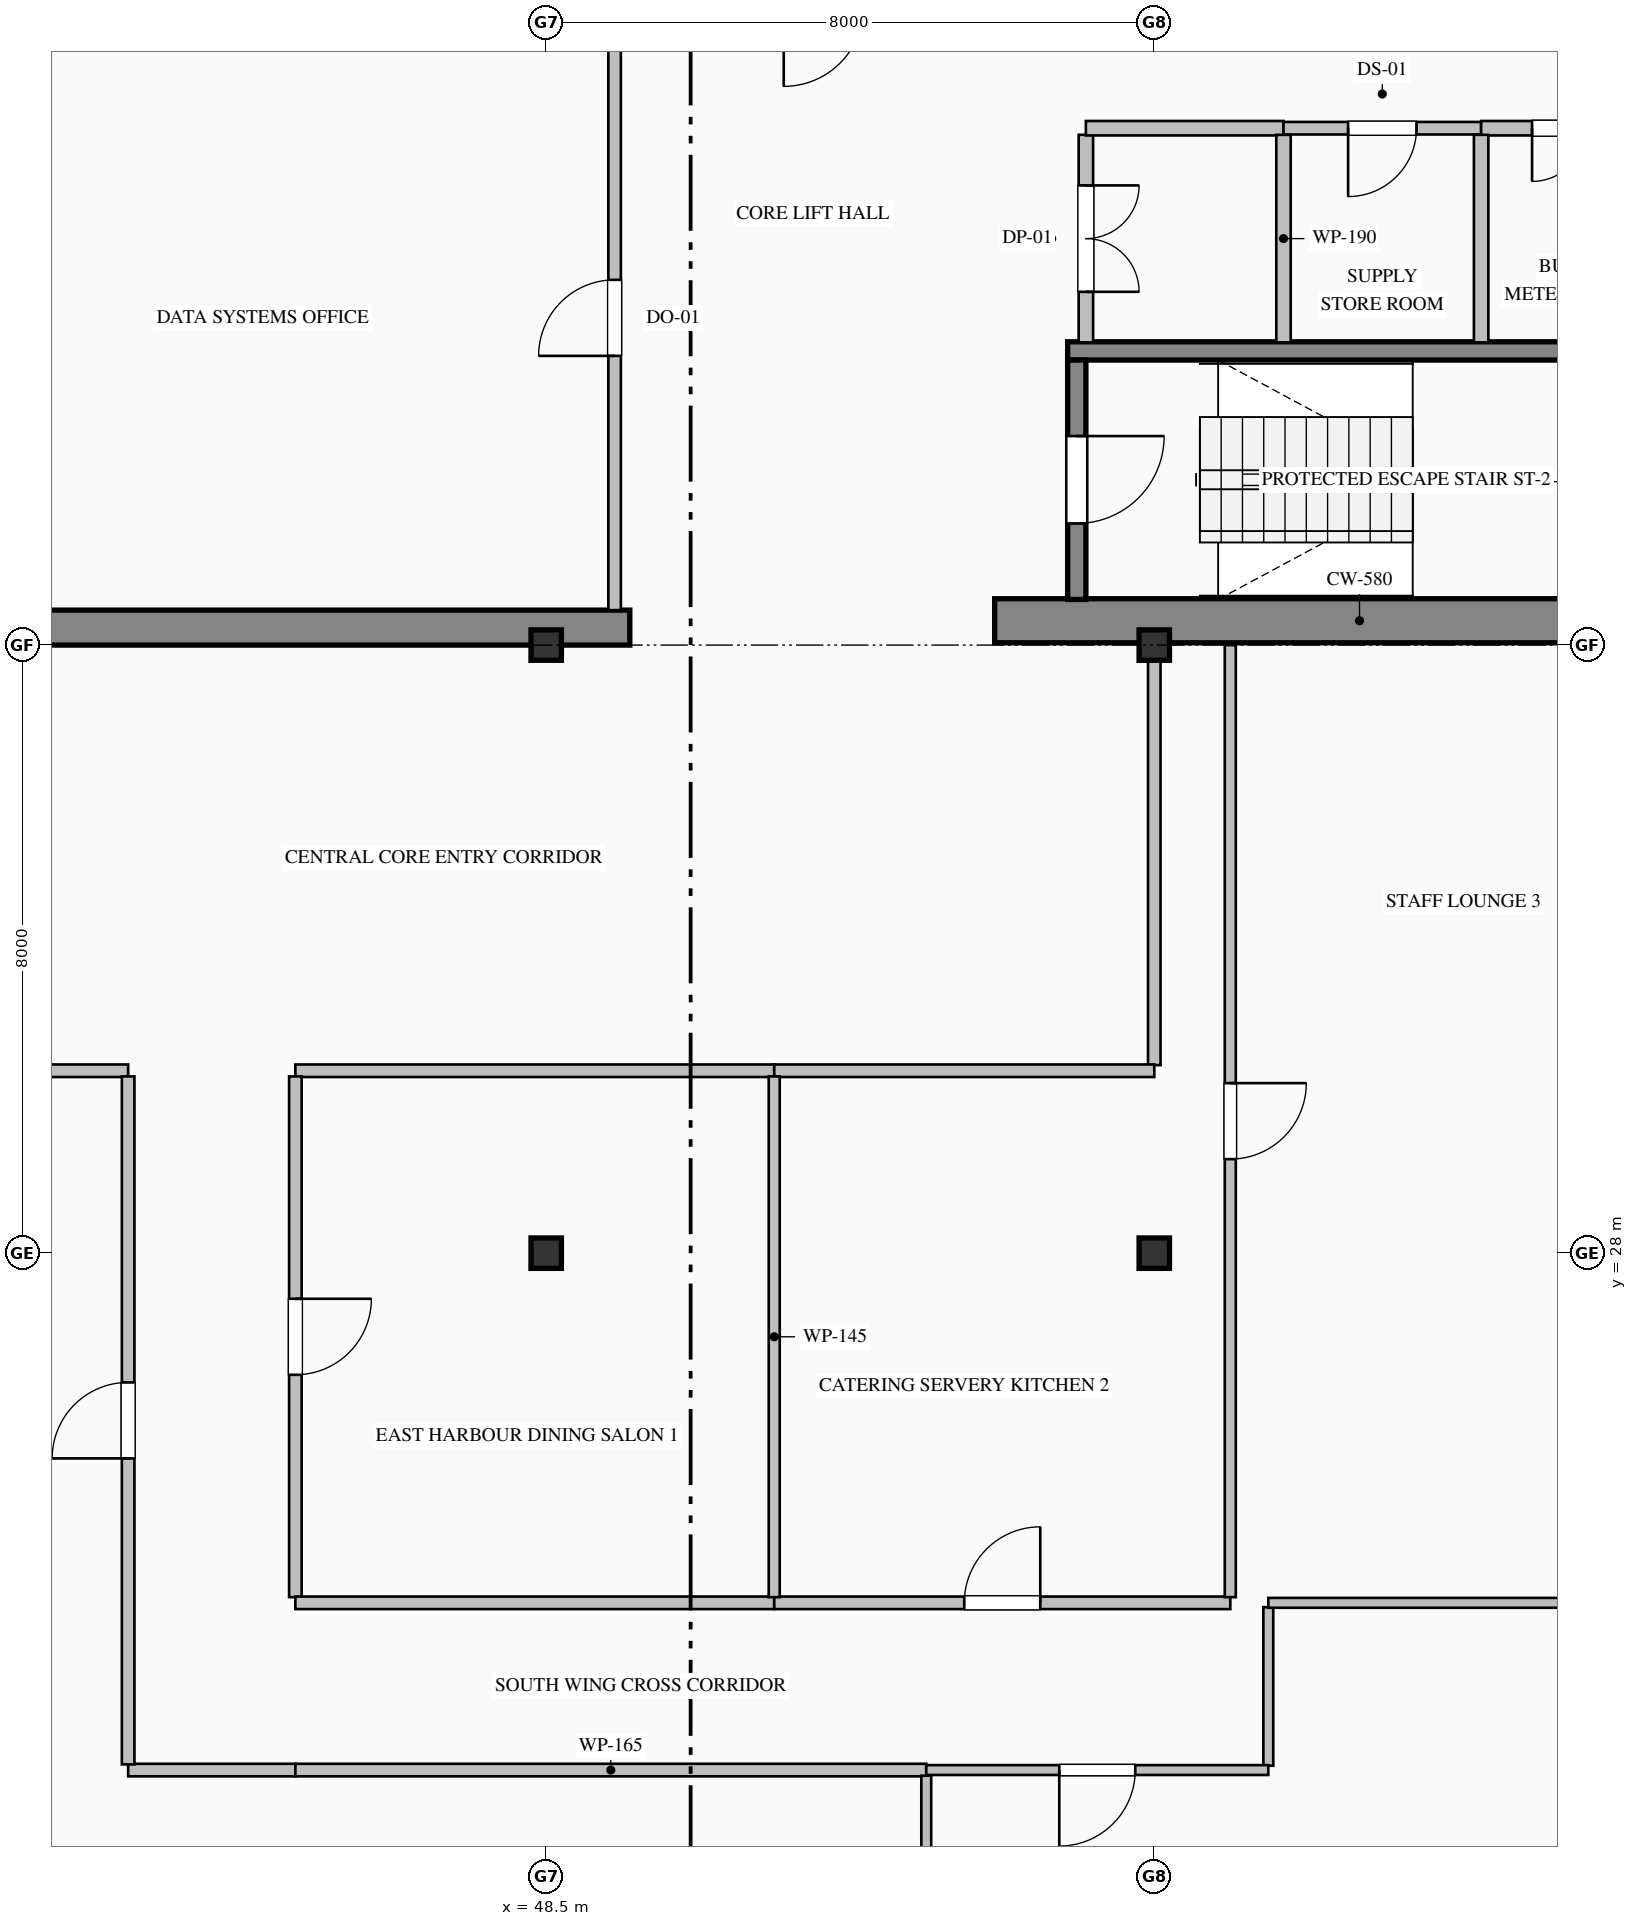
"""IFC4 building model, lengths in metres.
Left out: names, types, materials, properties, quantities, classifications, styles, units other than length and angle.
Written with IfcOpenShell. Run it as: python <this file> out.ifc"""

import sys

from ifc_helpers import new_model, si_unit, direction, frame, frame_2d, origin, origin_2d, place, context, subcontext, project, spatial, rectangle, i_section, extrude, element, fill, save


model = new_model("IFC4")
c1 = context("Model", 3, precision=1e-05, world=origin(), true_north=direction((0.0, 1.0)))
c2 = subcontext(c1, "Body", "Model", "MODEL_VIEW")
j1 = project(units=[si_unit("LENGTHUNIT", "METRE"), si_unit("PLANEANGLEUNIT", "RADIAN")], contexts=[c1])
p1 = place(None, origin())
s1 = spatial("IfcSite", under=j1, at=p1, CompositionType="ELEMENT")
p2 = place(p1, origin())
s2 = spatial("IfcBuilding", under=s1, at=p2, CompositionType="ELEMENT")
p3 = place(p2, frame((0.0, 0.0, 241.8)))
s3 = spatial("IfcBuildingStorey", under=s2, at=p3, CompositionType="ELEMENT", Elevation=241.8)
p4 = place(p3, frame((40.5, 36.23, 0.0), z_axis=(0.0, 0.0, 1.0), x_axis=(1.0, 0.0, 0.0)))
e1 = element("IfcWall", 1, at=p4, inside=s3, PredefinedType="SHEAR", context=c2, shape_type="SweptSolid", body=[
    extrude(rectangle(XDim=9.1, YDim=0.46, at=frame_2d((4.55, 0.0))), origin(), (0.0, 0.0, 1.0), 3.775),
])
p5 = place(p3, frame((54.4, 36.32, 0.0), z_axis=(0.0, 0.0, 1.0), x_axis=(1.0, 0.0, 0.0)))
e2 = element("IfcWall", 2, at=p5, inside=s3, PredefinedType="SHEAR", context=c2, shape_type="SweptSolid", body=[
    extrude(rectangle(XDim=9.6, YDim=0.58, at=frame_2d((4.8, 0.0))), origin(), (0.0, 0.0, 1.0), 4.0),
])
for number, where, z_axis, x_axis in (
    (3, (48.5, 28.0, 0.0), (0.0, 0.0, 1.0), (1.0, 0.0, 0.0)),
    (4, (48.5, 36.0, 0.0), (0.0, 0.0, 1.0), (1.0, 0.0, 0.0)),
    (5, (56.5, 28.0, 0.0), (0.0, 0.0, 1.0), (1.0, 0.0, 0.0)),
    (6, (56.5, 36.0, 0.0), (0.0, 0.0, 1.0), (1.0, 0.0, 0.0)),
):
    element("IfcColumn", number, at=place(p3, frame(where, z_axis=z_axis, x_axis=x_axis)), inside=s3, PredefinedType="COLUMN", context=c2, shape_type="SweptSolid", body=[
        extrude(i_section(OverallWidth=0.4, OverallDepth=0.4, WebThickness=0.013, FlangeThickness=0.021, FilletRadius=0.022, at=origin_2d()), origin(), (0.0, 0.0, 1.0), 4.0),
    ])
p6 = place(p3, frame((55.36, 39.87, 0.0), z_axis=(0.0, 0.0, 1.0), x_axis=(1.0, 0.0, 0.0)))
e7 = element("IfcWall", 7, at=p6, inside=s3, PredefinedType="SOLIDWALL", context=c2, shape_type="SweptSolid", body=[
    extrude(rectangle(XDim=8.08, YDim=0.24, at=frame_2d((4.04, 0.0))), origin(), (0.0, 0.0, 1.0), 4.0),
])
p7 = place(p3, frame((55.48, 39.75, 0.0), z_axis=(0.0, 0.0, 1.0), x_axis=(0.0, -1.0, 0.0)))
e8 = element("IfcWall", 8, at=p7, inside=s3, PredefinedType="SOLIDWALL", context=c2, shape_type="SweptSolid", body=[
    extrude(rectangle(XDim=3.15, YDim=0.24, at=frame_2d((1.575, 0.0))), origin(), (0.0, 0.0, 1.0), 4.0),
])
p8 = place(p7, frame((1.0, 0.0, 0.0)))
e9 = element("IfcOpeningElement", 9, at=p8, cuts=e8, PredefinedType="OPENING", context=c2, shape_type="SweptSolid", body=[
    extrude(rectangle(XDim=1.15, YDim=2.2, at=frame_2d((0.575, 1.1))), frame((0.0, 0.13, 0.0), z_axis=(0.0, -1.0, 0.0), x_axis=(1.0, 0.0, 0.0)), (0.0, 0.0, 1.0), 0.26),
])
p9 = place(p3, frame((49.4, 36.46, 0.0), z_axis=(0.0, 0.0, 1.0), x_axis=(0.0, 1.0, 0.0)))
e10 = element("IfcWall", 10, at=p9, inside=s3, PredefinedType="PARTITIONING", context=c2, shape_type="SweptSolid", body=[
    extrude(rectangle(XDim=7.69, YDim=0.165, at=frame_2d((3.845, 0.0))), origin(), (0.0, 0.0, 1.0), 3.017),
])
p10 = place(p9, frame((3.345, 0.0, 0.0)))
e11 = element("IfcOpeningElement", 11, at=p10, cuts=e10, PredefinedType="OPENING", context=c2, shape_type="SweptSolid", body=[
    extrude(rectangle(XDim=1.0, YDim=2.15, at=frame_2d((0.5, 1.075))), frame((0.0, 0.093, 0.0), z_axis=(0.0, -1.0, 0.0), x_axis=(1.0, 0.0, 0.0)), (0.0, 0.0, 1.0), 0.185),
])
p11 = place(p3, frame((55.6, 42.713, 0.0), z_axis=(0.0, 0.0, 1.0), x_axis=(0.0, -1.0, 0.0)))
e12 = element("IfcWall", 12, at=p11, inside=s3, PredefinedType="PARTITIONING", context=c2, shape_type="SweptSolid", body=[
    extrude(rectangle(XDim=2.731, YDim=0.19, at=frame_2d((1.365, 0.0))), origin(), (0.0, 0.0, 1.0), 3.775),
])
p12 = place(p11, frame((0.666, 0.0, 0.0)))
e13 = element("IfcOpeningElement", 13, at=p12, cuts=e12, PredefinedType="OPENING", context=c2, shape_type="SweptSolid", body=[
    extrude(rectangle(XDim=1.4, YDim=2.25, at=frame_2d((0.7, 1.125))), frame((0.0, 0.105, 0.0), z_axis=(0.0, -1.0, 0.0), x_axis=(1.0, 0.0, 0.0)), (0.0, 0.0, 1.0), 0.21),
])
p13 = place(p3, frame((58.2, 42.8, 0.0), z_axis=(0.0, 0.0, 1.0), x_axis=(-1.0, 0.0, 0.0)))
e14 = element("IfcWall", 14, at=p13, inside=s3, PredefinedType="PARTITIONING", context=c2, shape_type="SweptSolid", body=[
    extrude(rectangle(XDim=2.6, YDim=0.19, at=frame_2d((1.3, 0.0))), origin(), (0.0, 0.0, 1.0), 3.775),
])
p14 = place(p3, frame((60.8, 42.8, 0.0), z_axis=(0.0, 0.0, 1.0), x_axis=(-1.0, 0.0, 0.0)))
e15 = element("IfcWall", 15, at=p14, inside=s3, PredefinedType="PARTITIONING", context=c2, shape_type="SweptSolid", body=[
    extrude(rectangle(XDim=2.6, YDim=0.165, at=frame_2d((1.3, 0.0))), origin(), (0.0, 0.0, 1.0), 3.775),
])
p15 = place(p14, frame((0.85, 0.0, 0.0)))
e16 = element("IfcOpeningElement", 16, at=p15, cuts=e15, PredefinedType="OPENING", context=c2, shape_type="SweptSolid", body=[
    extrude(rectangle(XDim=0.9, YDim=2.15, at=frame_2d((0.45, 1.075))), frame((0.0, 0.093, 0.0), z_axis=(0.0, -1.0, 0.0), x_axis=(1.0, 0.0, 0.0)), (0.0, 0.0, 1.0), 0.185),
])
p16 = place(p3, frame((63.54, 42.8, 0.0), z_axis=(0.0, 0.0, 1.0), x_axis=(-1.0, 0.0, 0.0)))
e17 = element("IfcWall", 17, at=p16, inside=s3, PredefinedType="PARTITIONING", context=c2, shape_type="SweptSolid", body=[
    extrude(rectangle(XDim=2.74, YDim=0.19, at=frame_2d((1.37, 0.0))), origin(), (0.0, 0.0, 1.0), 3.775),
])
p17 = place(p16, frame((0.67, 0.0, 0.0)))
e18 = element("IfcOpeningElement", 18, at=p17, cuts=e17, PredefinedType="OPENING", context=c2, shape_type="SweptSolid", body=[
    extrude(rectangle(XDim=1.4, YDim=2.25, at=frame_2d((0.7, 1.125))), frame((0.0, 0.105, 0.0), z_axis=(0.0, -1.0, 0.0), x_axis=(1.0, 0.0, 0.0)), (0.0, 0.0, 1.0), 0.21),
])
for number, where, z_axis, x_axis in (
    (19, (58.2, 42.713, 0.0), (0.0, 0.0, 1.0), (0.0, -1.0, 0.0)),
    (20, (60.8, 42.713, 0.0), (0.0, 0.0, 1.0), (0.0, -1.0, 0.0)),
):
    element("IfcWall", number, at=place(p3, frame(where, z_axis=z_axis, x_axis=x_axis)), inside=s3, PredefinedType="PARTITIONING", context=c2, shape_type="SweptSolid", body=[
        extrude(rectangle(XDim=2.731, YDim=0.19, at=frame_2d((1.365, 0.0))), origin(), (0.0, 0.0, 1.0), 3.775),
    ])
p18 = place(p3, frame((51.5, 30.4, 0.0), z_axis=(0.0, 0.0, 1.0), x_axis=(-1.0, 0.0, 0.0)))
e21 = element("IfcWall", 21, at=p18, inside=s3, PredefinedType="PARTITIONING", context=c2, shape_type="SweptSolid", body=[
    extrude(rectangle(XDim=6.3, YDim=0.165, at=frame_2d((3.15, 0.0))), origin(), (0.0, 0.0, 1.0), 3.775),
])
p19 = place(p3, frame((56.5, 36.0, 0.0), z_axis=(0.0, 0.0, 1.0), x_axis=(0.0, -1.0, 0.0)))
e22 = element("IfcWall", 22, at=p19, inside=s3, PredefinedType="PARTITIONING", context=c2, shape_type="SweptSolid", body=[
    extrude(rectangle(XDim=5.525, YDim=0.165, at=frame_2d((2.763, 0.0))), origin(), (0.0, 0.0, 1.0), 3.179),
])
p20 = place(p3, frame((56.5, 30.4, 0.0), z_axis=(0.0, 0.0, 1.0), x_axis=(-1.0, 0.0, 0.0)))
e23 = element("IfcWall", 23, at=p20, inside=s3, PredefinedType="PARTITIONING", context=c2, shape_type="SweptSolid", body=[
    extrude(rectangle(XDim=5.0, YDim=0.165, at=frame_2d((2.5, 0.0))), origin(), (0.0, 0.0, 1.0), 3.775),
])
p21 = place(p3, frame((43.0, 30.4, 0.0), z_axis=(0.0, 0.0, 1.0), x_axis=(-1.0, 0.0, 0.0)))
e24 = element("IfcWall", 24, at=p21, inside=s3, PredefinedType="PARTITIONING", context=c2, shape_type="SweptSolid", body=[
    extrude(rectangle(XDim=2.5, YDim=0.165, at=frame_2d((1.25, 0.0))), origin(), (0.0, 0.0, 1.0), 3.775),
])
p22 = place(p3, frame((45.2, 30.325, 0.0), z_axis=(0.0, 0.0, 1.0), x_axis=(0.0, -1.0, 0.0)))
e25 = element("IfcWall", 25, at=p22, inside=s3, PredefinedType="PARTITIONING", context=c2, shape_type="SweptSolid", body=[
    extrude(rectangle(XDim=6.851, YDim=0.165, at=frame_2d((3.425, 0.0))), origin(), (0.0, 0.0, 1.0), 3.775),
])
p23 = place(p22, frame((2.926, 0.0, 0.0)))
e26 = element("IfcOpeningElement", 26, at=p23, cuts=e25, PredefinedType="OPENING", context=c2, shape_type="SweptSolid", body=[
    extrude(rectangle(XDim=1.0, YDim=2.15, at=frame_2d((0.5, 1.075))), frame((0.0, 0.093, 0.0), z_axis=(0.0, -1.0, 0.0), x_axis=(1.0, 0.0, 0.0)), (0.0, 0.0, 1.0), 0.185),
])
p24 = place(p3, frame((45.2, 21.2, 0.0), z_axis=(0.0, 0.0, 1.0), x_axis=(-1.0, 0.0, 0.0)))
e27 = element("IfcWall", 27, at=p24, inside=s3, PredefinedType="PARTITIONING", context=c2, shape_type="SweptSolid", body=[
    extrude(rectangle(XDim=2.2, YDim=0.165, at=frame_2d((1.1, 0.0))), origin(), (0.0, 0.0, 1.0), 3.775),
])
p25 = place(p3, frame((43.0, 21.274, 0.0), z_axis=(0.0, 0.0, 1.0), x_axis=(0.0, 1.0, 0.0)))
e28 = element("IfcWall", 28, at=p25, inside=s3, PredefinedType="PARTITIONING", context=c2, shape_type="SweptSolid", body=[
    extrude(rectangle(XDim=9.051, YDim=0.165, at=frame_2d((4.525, 0.0))), origin(), (0.0, 0.0, 1.0), 3.775),
])
p26 = place(p25, frame((4.025, 0.0, 0.0)))
e29 = element("IfcOpeningElement", 29, at=p26, cuts=e28, PredefinedType="OPENING", context=c2, shape_type="SweptSolid", body=[
    extrude(rectangle(XDim=1.0, YDim=2.15, at=frame_2d((0.5, 1.075))), frame((0.0, 0.093, 0.0), z_axis=(0.0, -1.0, 0.0), x_axis=(1.0, 0.0, 0.0)), (0.0, 0.0, 1.0), 0.185),
])
p27 = place(p3, frame((45.2, 23.4, 0.0), z_axis=(0.0, 0.0, 1.0), x_axis=(1.0, 0.0, 0.0)))
e30 = element("IfcWall", 30, at=p27, inside=s3, PredefinedType="PARTITIONING", context=c2, shape_type="SweptSolid", body=[
    extrude(rectangle(XDim=6.3, YDim=0.165, at=frame_2d((3.15, 0.0))), origin(), (0.0, 0.0, 1.0), 3.467),
])
p28 = place(p3, frame((51.5, 23.4, 0.0), z_axis=(0.0, 0.0, 1.0), x_axis=(1.0, 0.0, 0.0)))
e31 = element("IfcWall", 31, at=p28, inside=s3, PredefinedType="PARTITIONING", context=c2, shape_type="SweptSolid", body=[
    extrude(rectangle(XDim=6.0, YDim=0.165, at=frame_2d((3.0, 0.0))), origin(), (0.0, 0.0, 1.0), 3.467),
])
p29 = place(p28, frame((2.5, 0.0, 0.0)))
e32 = element("IfcOpeningElement", 32, at=p29, cuts=e31, PredefinedType="OPENING", context=c2, shape_type="SweptSolid", body=[
    extrude(rectangle(XDim=1.0, YDim=2.15, at=frame_2d((0.5, 1.075))), frame((0.0, 0.093, 0.0), z_axis=(0.0, -1.0, 0.0), x_axis=(1.0, 0.0, 0.0)), (0.0, 0.0, 1.0), 0.185),
])
p30 = place(p3, frame((53.5, 21.2, 0.0), z_axis=(0.0, 0.0, 1.0), x_axis=(-1.0, 0.0, 0.0)))
e33 = element("IfcWall", 33, at=p30, inside=s3, PredefinedType="PARTITIONING", context=c2, shape_type="SweptSolid", body=[
    extrude(rectangle(XDim=8.3, YDim=0.165, at=frame_2d((4.15, 0.0))), origin(), (0.0, 0.0, 1.0), 3.775),
])
p31 = place(p3, frame((58.0, 23.343, 0.0), z_axis=(0.0, 0.0, 1.0), x_axis=(0.0, -1.0, 0.0)))
e34 = element("IfcWall", 34, at=p31, inside=s3, PredefinedType="PARTITIONING", context=c2, shape_type="SweptSolid", body=[
    extrude(rectangle(XDim=2.086, YDim=0.13, at=frame_2d((1.043, 0.0))), origin(), (0.0, 0.0, 1.0), 3.775),
])
p32 = place(p3, frame((58.0, 21.2, 0.0), z_axis=(0.0, 0.0, 1.0), x_axis=(-1.0, 0.0, 0.0)))
e35 = element("IfcWall", 35, at=p32, inside=s3, PredefinedType="PARTITIONING", context=c2, shape_type="SweptSolid", body=[
    extrude(rectangle(XDim=4.5, YDim=0.13, at=frame_2d((2.25, 0.0))), origin(), (0.0, 0.0, 1.0), 3.775),
])
p33 = place(p32, frame((1.75, 0.0, 0.0)))
e36 = element("IfcOpeningElement", 36, at=p33, cuts=e35, PredefinedType="OPENING", context=c2, shape_type="SweptSolid", body=[
    extrude(rectangle(XDim=1.0, YDim=2.15, at=frame_2d((0.5, 1.075))), frame((0.0, 0.075, 0.0), z_axis=(0.0, -1.0, 0.0), x_axis=(1.0, 0.0, 0.0)), (0.0, 0.0, 1.0), 0.15),
])
p34 = place(p3, frame((51.5, 30.325, 0.0), z_axis=(0.0, 0.0, 1.0), x_axis=(0.0, -1.0, 0.0)))
e37 = element("IfcWall", 37, at=p34, inside=s3, PredefinedType="PARTITIONING", context=c2, shape_type="SweptSolid", body=[
    extrude(rectangle(XDim=6.851, YDim=0.145, at=frame_2d((3.425, 0.0))), origin(), (0.0, 0.0, 1.0), 3.775),
])
p35 = place(p3, frame((57.5, 36.0, 0.0), z_axis=(0.0, 0.0, 1.0), x_axis=(0.0, -1.0, 0.0)))
e38 = element("IfcWall", 38, at=p35, inside=s3, PredefinedType="PARTITIONING", context=c2, shape_type="SweptSolid", body=[
    extrude(rectangle(XDim=12.525, YDim=0.145, at=frame_2d((6.263, 0.0))), origin(), (0.0, 0.0, 1.0), 3.775),
])
p36 = place(p35, frame((5.763, 0.0, 0.0)))
e39 = element("IfcOpeningElement", 39, at=p36, cuts=e38, PredefinedType="OPENING", context=c2, shape_type="SweptSolid", body=[
    extrude(rectangle(XDim=1.0, YDim=2.15, at=frame_2d((0.5, 1.075))), frame((0.0, 0.083, 0.0), z_axis=(0.0, -1.0, 0.0), x_axis=(1.0, 0.0, 0.0)), (0.0, 0.0, 1.0), 0.165),
])
p37 = place(p3, frame((63.648, 23.4, 0.0), z_axis=(0.0, 0.0, 1.0), x_axis=(-1.0, 0.0, 0.0)))
e40 = element("IfcWall", 40, at=p37, inside=s3, PredefinedType="PARTITIONING", context=c2, shape_type="SweptSolid", body=[
    extrude(rectangle(XDim=5.648, YDim=0.13, at=frame_2d((2.824, 0.0))), origin(), (0.0, 0.0, 1.0), 3.775),
])
p38 = place(p3, frame((53.5, 21.125, 0.0), z_axis=(0.0, 0.0, 1.0), x_axis=(0.0, -1.0, 0.0)))
e41 = element("IfcWall", 41, at=p38, inside=s3, PredefinedType="PARTITIONING", context=c2, shape_type="SweptSolid", body=[
    extrude(rectangle(XDim=8.273, YDim=0.13, at=frame_2d((4.137, 0.0))), origin(), (0.0, 0.0, 1.0), 3.775),
])
p39 = place(p8, origin())
e42 = element("IfcDoor", 42, at=p39, inside=s3, OperationType="SINGLE_SWING_LEFT", PredefinedType="DOOR", context=c2, shape_type="SweptSolid", body=[
    extrude(rectangle(XDim=1.15, YDim=2.2, at=frame_2d((0.575, 1.1))), frame((0.0, 0.025, 0.0), z_axis=(0.0, -1.0, 0.0), x_axis=(1.0, 0.0, 0.0)), (0.0, 0.0, 1.0), 0.05),
])
fill(e9, e42)
p40 = place(p10, origin())
e43 = element("IfcDoor", 43, at=p40, inside=s3, OperationType="SINGLE_SWING_LEFT", PredefinedType="DOOR", context=c2, shape_type="SweptSolid", body=[
    extrude(rectangle(XDim=1.0, YDim=2.15, at=frame_2d((0.5, 1.075))), frame((0.0, 0.025, 0.0), z_axis=(0.0, -1.0, 0.0), x_axis=(1.0, 0.0, 0.0)), (0.0, 0.0, 1.0), 0.05),
])
fill(e11, e43)
p41 = place(p12, origin())
e44 = element("IfcDoor", 44, at=p41, inside=s3, OperationType="DOUBLE_DOOR_SINGLE_SWING", PredefinedType="DOOR", context=c2, shape_type="SweptSolid", body=[
    extrude(rectangle(XDim=1.4, YDim=2.25, at=frame_2d((0.7, 1.125))), frame((0.0, 0.025, 0.0), z_axis=(0.0, -1.0, 0.0), x_axis=(1.0, 0.0, 0.0)), (0.0, 0.0, 1.0), 0.05),
])
fill(e13, e44)
p42 = place(p15, origin())
e45 = element("IfcDoor", 45, at=p42, inside=s3, OperationType="SINGLE_SWING_RIGHT", PredefinedType="DOOR", context=c2, shape_type="SweptSolid", body=[
    extrude(rectangle(XDim=0.9, YDim=2.15, at=frame_2d((0.45, 1.075))), frame((0.0, 0.025, 0.0), z_axis=(0.0, -1.0, 0.0), x_axis=(1.0, 0.0, 0.0)), (0.0, 0.0, 1.0), 0.05),
])
fill(e16, e45)
p43 = place(p17, origin())
e46 = element("IfcDoor", 46, at=p43, inside=s3, OperationType="DOUBLE_DOOR_SINGLE_SWING", PredefinedType="DOOR", context=c2, shape_type="SweptSolid", body=[
    extrude(rectangle(XDim=1.4, YDim=2.25, at=frame_2d((0.7, 1.125))), frame((0.0, 0.025, 0.0), z_axis=(0.0, -1.0, 0.0), x_axis=(1.0, 0.0, 0.0)), (0.0, 0.0, 1.0), 0.05),
])
fill(e18, e46)
p44 = place(p23, origin())
e47 = element("IfcDoor", 47, at=p44, inside=s3, OperationType="SINGLE_SWING_LEFT", PredefinedType="DOOR", context=c2, shape_type="SweptSolid", body=[
    extrude(rectangle(XDim=1.0, YDim=2.15, at=frame_2d((0.5, 1.075))), frame((0.0, 0.025, 0.0), z_axis=(0.0, -1.0, 0.0), x_axis=(1.0, 0.0, 0.0)), (0.0, 0.0, 1.0), 0.05),
])
fill(e26, e47)
p45 = place(p29, origin())
e48 = element("IfcDoor", 48, at=p45, inside=s3, OperationType="SINGLE_SWING_RIGHT", PredefinedType="DOOR", context=c2, shape_type="SweptSolid", body=[
    extrude(rectangle(XDim=1.0, YDim=2.15, at=frame_2d((0.5, 1.075))), frame((0.0, 0.025, 0.0), z_axis=(0.0, -1.0, 0.0), x_axis=(1.0, 0.0, 0.0)), (0.0, 0.0, 1.0), 0.05),
])
fill(e32, e48)
p46 = place(p36, origin())
e49 = element("IfcDoor", 49, at=p46, inside=s3, OperationType="SINGLE_SWING_LEFT", PredefinedType="DOOR", context=c2, shape_type="SweptSolid", body=[
    extrude(rectangle(XDim=1.0, YDim=2.15, at=frame_2d((0.5, 1.075))), frame((0.0, 0.025, 0.0), z_axis=(0.0, -1.0, 0.0), x_axis=(1.0, 0.0, 0.0)), (0.0, 0.0, 1.0), 0.05),
])
fill(e39, e49)
p47 = place(p26, origin())
e50 = element("IfcDoor", 50, at=p47, inside=s3, OperationType="SINGLE_SWING_LEFT", PredefinedType="DOOR", context=c2, shape_type="SweptSolid", body=[
    extrude(rectangle(XDim=1.0, YDim=2.15, at=frame_2d((0.5, 1.075))), frame((0.0, 0.025, 0.0), z_axis=(0.0, -1.0, 0.0), x_axis=(1.0, 0.0, 0.0)), (0.0, 0.0, 1.0), 0.05),
])
fill(e29, e50)
p48 = place(p33, origin())
e51 = element("IfcDoor", 51, at=p48, inside=s3, OperationType="SINGLE_SWING_RIGHT", PredefinedType="DOOR", context=c2, shape_type="SweptSolid", body=[
    extrude(rectangle(XDim=1.0, YDim=2.15, at=frame_2d((0.5, 1.075))), frame((0.0, 0.025, 0.0), z_axis=(0.0, -1.0, 0.0), x_axis=(1.0, 0.0, 0.0)), (0.0, 0.0, 1.0), 0.05),
])
fill(e36, e51)
save(model, sys.argv[1])
